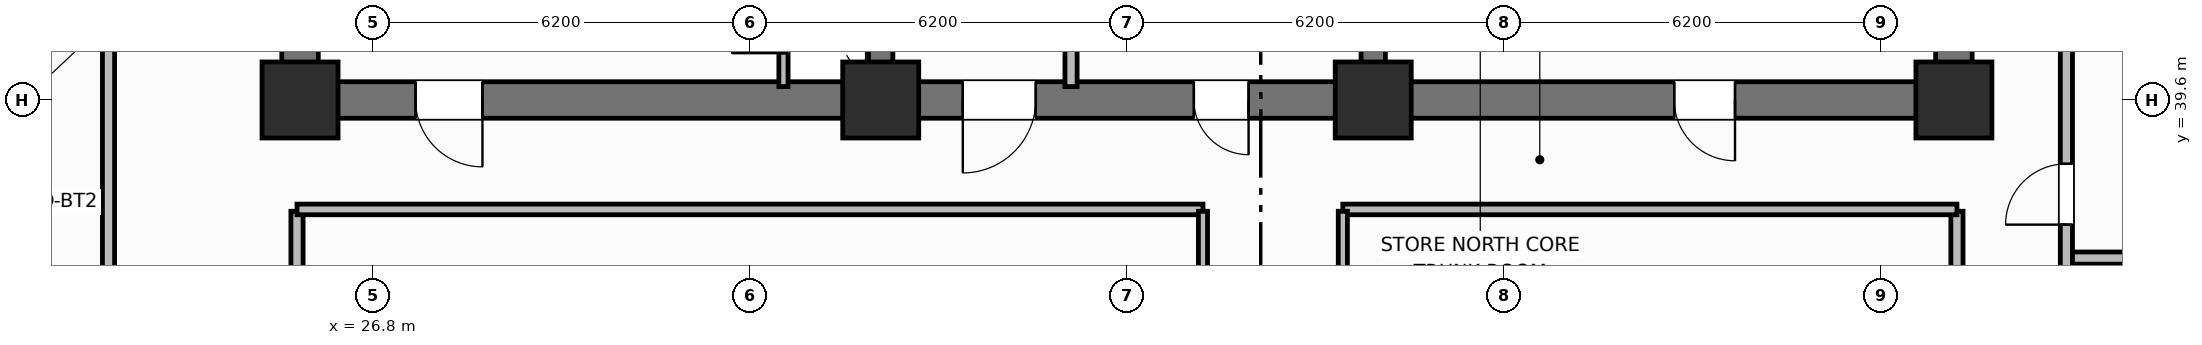
"""IFC4 building model, lengths in metres.
Left out: names, types, materials, properties, quantities, classifications, styles, units other than length and angle.
Written with IfcOpenShell. Run it as: python <this file> out.ifc"""

import sys

from ifc_helpers import new_model, si_unit, direction, frame, frame_2d, origin, origin_2d, place, context, subcontext, project, spatial, rectangle, extrude, element, fill, save


model = new_model("IFC4")
c1 = context("Model", 3, precision=1e-05, world=origin(), true_north=direction((0.0, 1.0)))
c2 = subcontext(c1, "Body", "Model", "MODEL_VIEW")
j1 = project(units=[si_unit("LENGTHUNIT", "METRE"), si_unit("PLANEANGLEUNIT", "RADIAN")], contexts=[c1])
p1 = place(None, origin())
s1 = spatial("IfcSite", under=j1, at=p1, CompositionType="ELEMENT")
p2 = place(p1, origin())
s2 = spatial("IfcBuilding", under=s1, at=p2, CompositionType="ELEMENT")
p3 = place(p2, frame((0.0, 0.0, 58.4)))
s3 = spatial("IfcBuildingStorey", under=s2, at=p3, CompositionType="ELEMENT", Elevation=58.4)
for number, where, z_axis, x_axis in (
    (1, (25.6, 39.9, 0.0), (0.0, 0.0, 1.0), (0.0, 1.0, 0.0)),
    (2, (52.8, 39.9, 0.0), (0.0, 0.0, 1.0), (0.0, 1.0, 0.0)),
):
    element("IfcWall", number, at=place(p3, frame(where, z_axis=z_axis, x_axis=x_axis)), inside=s3, PredefinedType="SHEAR", context=c2, shape_type="SweptSolid", body=[
        extrude(rectangle(XDim=5.6, YDim=0.6, at=frame_2d((2.8, 0.0))), origin(), (0.0, 0.0, 1.0), 3.7),
    ])
p4 = place(p3, frame((52.8, 39.6, 0.0), z_axis=(0.0, 0.0, 1.0), x_axis=(-1.0, 0.0, 0.0)))
e3 = element("IfcWall", 3, at=p4, inside=s3, PredefinedType="SHEAR", context=c2, shape_type="SweptSolid", body=[
    extrude(rectangle(XDim=27.2, YDim=0.6, at=frame_2d((13.6, 0.0))), origin(), (0.0, 0.0, 1.0), 3.7),
])
p5 = place(p4, frame((24.2, 0.0, 0.0)))
e4 = element("IfcOpeningElement", 4, at=p5, cuts=e3, PredefinedType="OPENING", context=c2, shape_type="SweptSolid", body=[
    extrude(rectangle(XDim=1.1, YDim=2.15, at=frame_2d((0.55, 1.075))), frame((0.0, 0.31, 0.0), z_axis=(0.0, -1.0, 0.0), x_axis=(1.0, 0.0, 0.0)), (0.0, 0.0, 1.0), 0.62),
])
p6 = place(p4, frame((15.1, 0.0, 0.0)))
e5 = element("IfcOpeningElement", 5, at=p6, cuts=e3, PredefinedType="OPENING", context=c2, shape_type="SweptSolid", body=[
    extrude(rectangle(XDim=1.2, YDim=2.15, at=frame_2d((0.6, 1.075))), frame((0.0, 0.31, 0.0), z_axis=(0.0, -1.0, 0.0), x_axis=(1.0, 0.0, 0.0)), (0.0, 0.0, 1.0), 0.62),
])
p7 = place(p4, frame((11.6, 0.0, 0.0)))
e6 = element("IfcOpeningElement", 6, at=p7, cuts=e3, PredefinedType="OPENING", context=c2, shape_type="SweptSolid", body=[
    extrude(rectangle(XDim=0.9, YDim=2.1, at=frame_2d((0.45, 1.05))), frame((0.0, 0.31, 0.0), z_axis=(0.0, -1.0, 0.0), x_axis=(1.0, 0.0, 0.0)), (0.0, 0.0, 1.0), 0.62),
])
p8 = place(p4, frame((3.6, 0.0, 0.0)))
e7 = element("IfcOpeningElement", 7, at=p8, cuts=e3, PredefinedType="OPENING", context=c2, shape_type="SweptSolid", body=[
    extrude(rectangle(XDim=1.0, YDim=2.15, at=frame_2d((0.5, 1.075))), frame((0.0, 0.31, 0.0), z_axis=(0.0, -1.0, 0.0), x_axis=(1.0, 0.0, 0.0)), (0.0, 0.0, 1.0), 0.62),
])
for number, where, z_axis, x_axis in (
    (8, (35.15, 39.9, 0.0), (0.0, 0.0, 1.0), (0.0, 1.0, 0.0)),
    (9, (43.25, 39.9, 0.0), (0.0, 0.0, 1.0), (0.0, 1.0, 0.0)),
):
    element("IfcWall", number, at=place(p3, frame(where, z_axis=z_axis, x_axis=x_axis)), inside=s3, PredefinedType="SHEAR", context=c2, shape_type="SweptSolid", body=[
        extrude(rectangle(XDim=5.6, YDim=0.4, at=frame_2d((2.8, 0.0))), origin(), (0.0, 0.0, 1.0), 3.7),
    ])
for number, where, z_axis, x_axis in (
    (10, (25.6, 39.6, 0.0), (0.0, 0.0, 1.0), (1.0, 0.0, 0.0)),
    (11, (35.15, 39.6, 0.0), (0.0, 0.0, 1.0), (1.0, 0.0, 0.0)),
    (12, (43.25, 39.6, 0.0), (0.0, 0.0, 1.0), (1.0, 0.0, 0.0)),
    (13, (52.8, 39.6, 0.0), (0.0, 0.0, 1.0), (1.0, 0.0, 0.0)),
):
    element("IfcColumn", number, at=place(p3, frame(where, z_axis=z_axis, x_axis=x_axis)), inside=s3, PredefinedType="COLUMN", context=c2, shape_type="SweptSolid", body=[
        extrude(rectangle(XDim=1.25, YDim=1.25, at=origin_2d()), origin(), (0.0, 0.0, 1.0), 3.7),
    ])
p9 = place(p3, frame((33.55, 39.82, 0.0), z_axis=(0.0, 0.0, 1.0), x_axis=(0.0, 1.0, 0.0)))
e14 = element("IfcWall", 14, at=p9, inside=s3, PredefinedType="PARTITIONING", context=c2, shape_type="SweptSolid", body=[
    extrude(rectangle(XDim=2.13, YDim=0.15, at=frame_2d((1.065, 0.0))), origin(), (0.0, 0.0, 1.0), 2.53),
])
p10 = place(p9, frame((0.55, 0.0, 0.0)))
e15 = element("IfcOpeningElement", 15, at=p10, cuts=e14, PredefinedType="OPENING", context=c2, shape_type="SweptSolid", body=[
    extrude(rectangle(XDim=0.85, YDim=2.05, at=frame_2d((0.425, 1.025))), frame((0.0, 0.085, 0.0), z_axis=(0.0, -1.0, 0.0), x_axis=(1.0, 0.0, 0.0)), (0.0, 0.0, 1.0), 0.17),
])
p11 = place(p3, frame((38.28, 39.82, 0.0), z_axis=(0.0, 0.0, 1.0), x_axis=(0.0, 1.0, 0.0)))
e16 = element("IfcWall", 16, at=p11, inside=s3, PredefinedType="PARTITIONING", context=c2, shape_type="SweptSolid", body=[
    extrude(rectangle(XDim=2.73, YDim=0.2, at=frame_2d((1.365, 0.0))), origin(), (0.0, 0.0, 1.0), 2.53),
])
for number, where, z_axis, x_axis in (
    (17, (25.55, 18.63, 0.0), (0.0, 0.0, 1.0), (0.0, 1.0, 0.0)),
    (18, (52.85, 18.63, 0.0), (0.0, 0.0, 1.0), (0.0, 1.0, 0.0)),
):
    element("IfcWall", number, at=place(p3, frame(where, z_axis=z_axis, x_axis=x_axis)), inside=s3, PredefinedType="PARTITIONING", context=c2, shape_type="SweptSolid", body=[
        extrude(rectangle(XDim=19.14, YDim=0.2, at=frame_2d((9.57, 0.0))), origin(), (0.0, 0.0, 1.0), 2.53),
    ])
p12 = place(p3, frame((25.55, 37.8, 0.0), z_axis=(0.0, 0.0, 1.0), x_axis=(1.0, 0.0, 0.0)))
e19 = element("IfcWall", 19, at=p12, inside=s3, PredefinedType="PARTITIONING", context=c2, shape_type="SweptSolid", body=[
    extrude(rectangle(XDim=14.9, YDim=0.175, at=frame_2d((7.45, 0.0))), origin(), (0.0, 0.0, 1.0), 2.53),
])
p13 = place(p3, frame((42.75, 37.8, 0.0), z_axis=(0.0, 0.0, 1.0), x_axis=(1.0, 0.0, 0.0)))
e20 = element("IfcWall", 20, at=p13, inside=s3, PredefinedType="PARTITIONING", context=c2, shape_type="SweptSolid", body=[
    extrude(rectangle(XDim=10.1, YDim=0.175, at=frame_2d((5.05, 0.0))), origin(), (0.0, 0.0, 1.0), 2.53),
])
p14 = place(p3, frame((40.45, 18.63, 0.0), z_axis=(0.0, 0.0, 1.0), x_axis=(0.0, 1.0, 0.0)))
e21 = element("IfcWall", 21, at=p14, inside=s3, PredefinedType="PARTITIONING", context=c2, shape_type="SweptSolid", body=[
    extrude(rectangle(XDim=19.14, YDim=0.15, at=frame_2d((9.57, 0.0))), origin(), (0.0, 0.0, 1.0), 2.53),
])
p15 = place(p14, frame((2.4, 0.0, 0.0)))
e22 = element("IfcOpeningElement", 22, at=p15, cuts=e21, PredefinedType="OPENING", context=c2, shape_type="SweptSolid", body=[
    extrude(rectangle(XDim=1.0, YDim=2.15, at=frame_2d((0.5, 1.075))), frame((0.0, 0.085, 0.0), z_axis=(0.0, -1.0, 0.0), x_axis=(1.0, 0.0, 0.0)), (0.0, 0.0, 1.0), 0.17),
])
p16 = place(p14, frame((11.4, 0.0, 0.0)))
e23 = element("IfcOpeningElement", 23, at=p16, cuts=e21, PredefinedType="OPENING", context=c2, shape_type="SweptSolid", body=[
    extrude(rectangle(XDim=1.0, YDim=2.15, at=frame_2d((0.5, 1.075))), frame((0.0, 0.085, 0.0), z_axis=(0.0, -1.0, 0.0), x_axis=(1.0, 0.0, 0.0)), (0.0, 0.0, 1.0), 0.17),
])
p17 = place(p3, frame((42.75, 18.63, 0.0), z_axis=(0.0, 0.0, 1.0), x_axis=(0.0, 1.0, 0.0)))
e24 = element("IfcWall", 24, at=p17, inside=s3, PredefinedType="PARTITIONING", context=c2, shape_type="SweptSolid", body=[
    extrude(rectangle(XDim=19.14, YDim=0.15, at=frame_2d((9.57, 0.0))), origin(), (0.0, 0.0, 1.0), 2.53),
])
p18 = place(p17, frame((5.5, 0.0, 0.0)))
e25 = element("IfcOpeningElement", 25, at=p18, cuts=e24, PredefinedType="OPENING", context=c2, shape_type="SweptSolid", body=[
    extrude(rectangle(XDim=1.0, YDim=2.15, at=frame_2d((0.5, 1.075))), frame((0.0, 0.085, 0.0), z_axis=(0.0, -1.0, 0.0), x_axis=(1.0, 0.0, 0.0)), (0.0, 0.0, 1.0), 0.17),
])
p19 = place(p3, frame((22.45, 10.6, 0.0), z_axis=(0.0, 0.0, 1.0), x_axis=(0.0, 1.0, 0.0)))
e26 = element("IfcWall", 26, at=p19, inside=s3, PredefinedType="PARTITIONING", context=c2, shape_type="SweptSolid", body=[
    extrude(rectangle(XDim=35.2, YDim=0.2, at=frame_2d((17.6, 0.0))), origin(), (0.0, 0.0, 1.0), 2.53),
])
p20 = place(p19, frame((2.65, 0.0, 0.0)))
e27 = element("IfcOpeningElement", 27, at=p20, cuts=e26, PredefinedType="OPENING", context=c2, shape_type="SweptSolid", body=[
    extrude(rectangle(XDim=1.0, YDim=2.15, at=frame_2d((0.5, 1.075))), frame((0.0, 0.11, 0.0), z_axis=(0.0, -1.0, 0.0), x_axis=(1.0, 0.0, 0.0)), (0.0, 0.0, 1.0), 0.22),
])
p21 = place(p19, frame((19.438, 0.0, 0.0)))
e28 = element("IfcOpeningElement", 28, at=p21, cuts=e26, PredefinedType="OPENING", context=c2, shape_type="SweptSolid", body=[
    extrude(rectangle(XDim=1.0, YDim=2.15, at=frame_2d((0.5, 1.075))), frame((0.0, 0.11, 0.0), z_axis=(0.0, -1.0, 0.0), x_axis=(1.0, 0.0, 0.0)), (0.0, 0.0, 1.0), 0.22),
])
p22 = place(p3, frame((54.65, 37.0, 0.0), z_axis=(0.0, 0.0, 1.0), x_axis=(1.0, 0.0, 0.0)))
e29 = element("IfcWall", 29, at=p22, inside=s3, PredefinedType="PARTITIONING", context=c2, shape_type="SweptSolid", body=[
    extrude(rectangle(XDim=9.18, YDim=0.2, at=frame_2d((4.59, 0.0))), origin(), (0.0, 0.0, 1.0), 2.53),
])
p23 = place(p3, frame((54.65, 10.6, 0.0), z_axis=(0.0, 0.0, 1.0), x_axis=(0.0, 1.0, 0.0)))
e30 = element("IfcWall", 30, at=p23, inside=s3, PredefinedType="PARTITIONING", context=c2, shape_type="SweptSolid", body=[
    extrude(rectangle(XDim=35.2, YDim=0.2, at=frame_2d((17.6, 0.0))), origin(), (0.0, 0.0, 1.0), 2.53),
])
p24 = place(p23, frame((2.65, 0.0, 0.0)))
e31 = element("IfcOpeningElement", 31, at=p24, cuts=e30, PredefinedType="OPENING", context=c2, shape_type="SweptSolid", body=[
    extrude(rectangle(XDim=1.0, YDim=2.15, at=frame_2d((0.5, 1.075))), frame((0.0, 0.11, 0.0), z_axis=(0.0, -1.0, 0.0), x_axis=(1.0, 0.0, 0.0)), (0.0, 0.0, 1.0), 0.22),
])
p25 = place(p23, frame((10.81, 0.0, 0.0)))
e32 = element("IfcOpeningElement", 32, at=p25, cuts=e30, PredefinedType="OPENING", context=c2, shape_type="SweptSolid", body=[
    extrude(rectangle(XDim=1.0, YDim=2.15, at=frame_2d((0.5, 1.075))), frame((0.0, 0.11, 0.0), z_axis=(0.0, -1.0, 0.0), x_axis=(1.0, 0.0, 0.0)), (0.0, 0.0, 1.0), 0.22),
])
p26 = place(p23, frame((19.54, 0.0, 0.0)))
e33 = element("IfcOpeningElement", 33, at=p26, cuts=e30, PredefinedType="OPENING", context=c2, shape_type="SweptSolid", body=[
    extrude(rectangle(XDim=1.0, YDim=2.15, at=frame_2d((0.5, 1.075))), frame((0.0, 0.11, 0.0), z_axis=(0.0, -1.0, 0.0), x_axis=(1.0, 0.0, 0.0)), (0.0, 0.0, 1.0), 0.22),
])
p27 = place(p23, frame((26.95, 0.0, 0.0)))
e34 = element("IfcOpeningElement", 34, at=p27, cuts=e30, PredefinedType="OPENING", context=c2, shape_type="SweptSolid", body=[
    extrude(rectangle(XDim=1.0, YDim=2.15, at=frame_2d((0.5, 1.075))), frame((0.0, 0.11, 0.0), z_axis=(0.0, -1.0, 0.0), x_axis=(1.0, 0.0, 0.0)), (0.0, 0.0, 1.0), 0.22),
])
p28 = place(p10, origin())
e35 = element("IfcDoor", 35, at=p28, inside=s3, OperationType="SINGLE_SWING_LEFT", PredefinedType="TRAPDOOR", context=c2, shape_type="SweptSolid", body=[
    extrude(rectangle(XDim=0.85, YDim=2.05, at=frame_2d((0.425, 1.025))), frame((0.0, 0.025, 0.0), z_axis=(0.0, -1.0, 0.0), x_axis=(1.0, 0.0, 0.0)), (0.0, 0.0, 1.0), 0.05),
])
fill(e15, e35)
p29 = place(p27, origin())
e36 = element("IfcDoor", 36, at=p29, inside=s3, OperationType="SINGLE_SWING_LEFT", PredefinedType="DOOR", context=c2, shape_type="SweptSolid", body=[
    extrude(rectangle(XDim=1.0, YDim=2.15, at=frame_2d((0.5, 1.075))), frame((0.0, 0.025, 0.0), z_axis=(0.0, -1.0, 0.0), x_axis=(1.0, 0.0, 0.0)), (0.0, 0.0, 1.0), 0.05),
])
fill(e34, e36)
p30 = place(p5, origin())
e37 = element("IfcDoor", 37, at=p30, inside=s3, OperationType="SINGLE_SWING_LEFT", PredefinedType="DOOR", context=c2, shape_type="SweptSolid", body=[
    extrude(rectangle(XDim=1.1, YDim=2.15, at=frame_2d((0.55, 1.075))), frame((0.0, 0.025, 0.0), z_axis=(0.0, -1.0, 0.0), x_axis=(1.0, 0.0, 0.0)), (0.0, 0.0, 1.0), 0.05),
])
fill(e4, e37)
p31 = place(p6, origin())
e38 = element("IfcDoor", 38, at=p31, inside=s3, OperationType="SINGLE_SWING_RIGHT", PredefinedType="DOOR", context=c2, shape_type="SweptSolid", body=[
    extrude(rectangle(XDim=1.2, YDim=2.15, at=frame_2d((0.6, 1.075))), frame((0.0, 0.025, 0.0), z_axis=(0.0, -1.0, 0.0), x_axis=(1.0, 0.0, 0.0)), (0.0, 0.0, 1.0), 0.05),
])
fill(e5, e38)
p32 = place(p7, origin())
e39 = element("IfcDoor", 39, at=p32, inside=s3, OperationType="SINGLE_SWING_LEFT", PredefinedType="DOOR", context=c2, shape_type="SweptSolid", body=[
    extrude(rectangle(XDim=0.9, YDim=2.1, at=frame_2d((0.45, 1.05))), frame((0.0, 0.025, 0.0), z_axis=(0.0, -1.0, 0.0), x_axis=(1.0, 0.0, 0.0)), (0.0, 0.0, 1.0), 0.05),
])
fill(e6, e39)
p33 = place(p8, origin())
e40 = element("IfcDoor", 40, at=p33, inside=s3, OperationType="SINGLE_SWING_LEFT", PredefinedType="DOOR", context=c2, shape_type="SweptSolid", body=[
    extrude(rectangle(XDim=1.0, YDim=2.15, at=frame_2d((0.5, 1.075))), frame((0.0, 0.025, 0.0), z_axis=(0.0, -1.0, 0.0), x_axis=(1.0, 0.0, 0.0)), (0.0, 0.0, 1.0), 0.05),
])
fill(e7, e40)
save(model, sys.argv[1])
